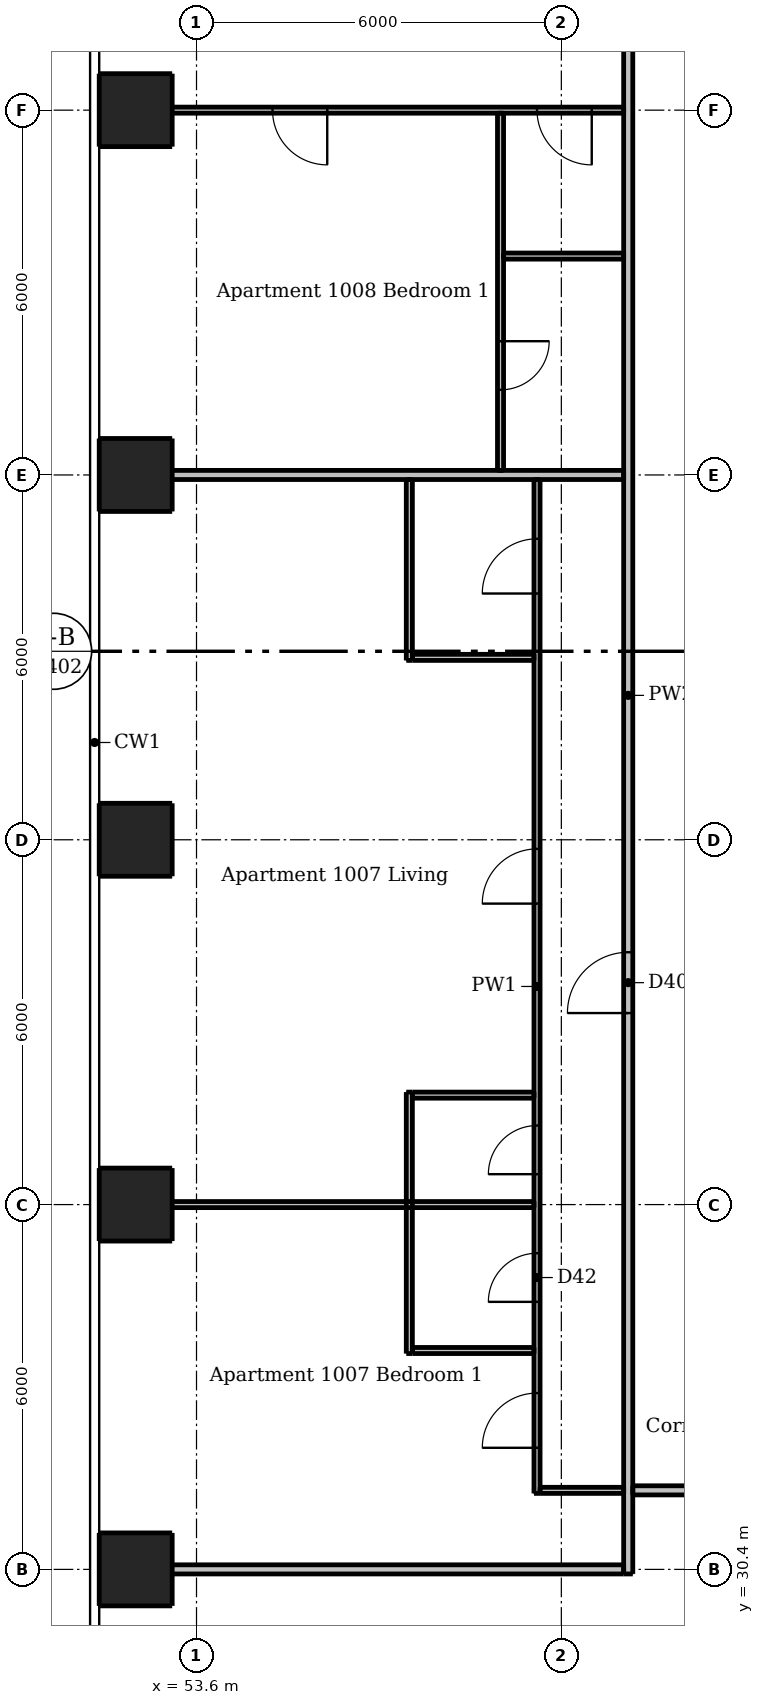
"""IFC4 building model, lengths in metres.
Left out: names, types, materials, properties, quantities, classifications, styles, units other than length and angle.
Written with IfcOpenShell. Run it as: python <this file> out.ifc"""

import sys

from ifc_helpers import new_model, si_unit, direction, frame, frame_2d, origin, origin_2d, place, context, subcontext, project, spatial, rectangle, extrude, element, fill, save


model = new_model("IFC4")
c1 = context("Model", 3, precision=1e-05, world=origin(), true_north=direction((0.0, 1.0)))
c2 = subcontext(c1, "Body", "Model", "MODEL_VIEW")
j1 = project(units=[si_unit("LENGTHUNIT", "METRE"), si_unit("PLANEANGLEUNIT", "RADIAN")], contexts=[c1])
p1 = place(None, origin())
s1 = spatial("IfcSite", under=j1, at=p1, CompositionType="ELEMENT")
p2 = place(p1, origin())
s2 = spatial("IfcBuilding", under=s1, at=p2, CompositionType="ELEMENT")
p3 = place(p2, frame((0.0, 0.0, 40.0)))
s3 = spatial("IfcBuildingStorey", under=s2, at=p3, CompositionType="ELEMENT", Elevation=40.0)
for number, where, z_axis, x_axis in (
    (1, (52.6, 30.4, 0.0), (0.0, 0.0, 1.0), (1.0, 0.0, 0.0)),
    (2, (52.6, 36.4, 0.0), (0.0, 0.0, 1.0), (1.0, 0.0, 0.0)),
    (3, (52.6, 42.4, 0.0), (0.0, 0.0, 1.0), (1.0, 0.0, 0.0)),
    (4, (52.6, 48.4, 0.0), (0.0, 0.0, 1.0), (1.0, 0.0, 0.0)),
    (5, (52.6, 54.4, 0.0), (0.0, 0.0, 1.0), (1.0, 0.0, 0.0)),
):
    element("IfcColumn", number, at=place(p3, frame(where, z_axis=z_axis, x_axis=x_axis)), inside=s3, PredefinedType="COLUMN", context=c2, shape_type="SweptSolid", body=[
        extrude(rectangle(XDim=1.2, YDim=1.2, at=origin_2d()), origin(), (0.0, 0.0, 1.0), 3.05),
    ])
p4 = place(p3, frame((57.1, 33.95, 0.0), z_axis=(0.0, 0.0, 1.0), x_axis=(0.0, 1.0, 0.0)))
e6 = element("IfcWall", 6, at=p4, inside=s3, PredefinedType="PARTITIONING", context=c2, shape_type="SweptSolid", body=[
    extrude(rectangle(XDim=4.3, YDim=0.1, at=frame_2d((2.15, 0.0))), origin(), (0.0, 0.0, 1.0), 3.05),
])
p5 = place(p3, frame((57.1, 45.35, 0.0), z_axis=(0.0, 0.0, 1.0), x_axis=(0.0, 1.0, 0.0)))
e7 = element("IfcWall", 7, at=p5, inside=s3, PredefinedType="PARTITIONING", context=c2, shape_type="SweptSolid", body=[
    extrude(rectangle(XDim=2.975, YDim=0.1, at=frame_2d((1.487, 0.0))), origin(), (0.0, 0.0, 1.0), 3.05),
])
p6 = place(p3, frame((58.6, 54.35, 0.0), z_axis=(0.0, 0.0, 1.0), x_axis=(0.0, -1.0, 0.0)))
e8 = element("IfcWall", 8, at=p6, inside=s3, PredefinedType="PARTITIONING", context=c2, shape_type="SweptSolid", body=[
    extrude(rectangle(XDim=5.875, YDim=0.1, at=frame_2d((2.938, 0.0))), origin(), (0.0, 0.0, 1.0), 3.05),
])
p7 = place(p6, frame((3.75, 0.0, 0.0)))
e9 = element("IfcOpeningElement", 9, at=p7, cuts=e8, PredefinedType="OPENING", context=c2, shape_type="SweptSolid", body=[
    extrude(rectangle(XDim=0.8, YDim=2.1, at=frame_2d((0.4, 1.05))), frame((0.0, 0.06, 0.0), z_axis=(0.0, -1.0, 0.0), x_axis=(1.0, 0.0, 0.0)), (0.0, 0.0, 1.0), 0.12),
])
p8 = place(p3, frame((59.2, 31.65, 0.0), z_axis=(0.0, 0.0, 1.0), x_axis=(0.0, 1.0, 0.0)))
e10 = element("IfcWall", 10, at=p8, inside=s3, PredefinedType="PARTITIONING", context=c2, shape_type="SweptSolid", body=[
    extrude(rectangle(XDim=16.675, YDim=0.1, at=frame_2d((8.337, 0.0))), origin(), (0.0, 0.0, 1.0), 3.05),
])
p9 = place(p8, frame((9.7, 0.0, 0.0)))
e11 = element("IfcOpeningElement", 11, at=p9, cuts=e10, PredefinedType="OPENING", context=c2, shape_type="SweptSolid", body=[
    extrude(rectangle(XDim=0.9, YDim=2.1, at=frame_2d((0.45, 1.05))), frame((0.0, 0.06, 0.0), z_axis=(0.0, -1.0, 0.0), x_axis=(1.0, 0.0, 0.0)), (0.0, 0.0, 1.0), 0.12),
])
p10 = place(p8, frame((14.8, 0.0, 0.0)))
e12 = element("IfcOpeningElement", 12, at=p10, cuts=e10, PredefinedType="OPENING", context=c2, shape_type="SweptSolid", body=[
    extrude(rectangle(XDim=0.9, YDim=2.1, at=frame_2d((0.45, 1.05))), frame((0.0, 0.06, 0.0), z_axis=(0.0, -1.0, 0.0), x_axis=(1.0, 0.0, 0.0)), (0.0, 0.0, 1.0), 0.12),
])
p11 = place(p8, frame((5.25, 0.0, 0.0)))
e13 = element("IfcOpeningElement", 13, at=p11, cuts=e10, PredefinedType="OPENING", context=c2, shape_type="SweptSolid", body=[
    extrude(rectangle(XDim=0.8, YDim=2.1, at=frame_2d((0.4, 1.05))), frame((0.0, 0.06, 0.0), z_axis=(0.0, -1.0, 0.0), x_axis=(1.0, 0.0, 0.0)), (0.0, 0.0, 1.0), 0.12),
])
p12 = place(p8, frame((0.75, 0.0, 0.0)))
e14 = element("IfcOpeningElement", 14, at=p12, cuts=e10, PredefinedType="OPENING", context=c2, shape_type="SweptSolid", body=[
    extrude(rectangle(XDim=0.9, YDim=2.1, at=frame_2d((0.45, 1.05))), frame((0.0, 0.06, 0.0), z_axis=(0.0, -1.0, 0.0), x_axis=(1.0, 0.0, 0.0)), (0.0, 0.0, 1.0), 0.12),
])
p13 = place(p8, frame((3.15, 0.0, 0.0)))
e15 = element("IfcOpeningElement", 15, at=p13, cuts=e10, PredefinedType="OPENING", context=c2, shape_type="SweptSolid", body=[
    extrude(rectangle(XDim=0.8, YDim=2.1, at=frame_2d((0.4, 1.05))), frame((0.0, 0.06, 0.0), z_axis=(0.0, -1.0, 0.0), x_axis=(1.0, 0.0, 0.0)), (0.0, 0.0, 1.0), 0.12),
])
p14 = place(p3, frame((60.625, 54.4, 0.0), z_axis=(0.0, 0.0, 1.0), x_axis=(-1.0, 0.0, 0.0)))
e16 = element("IfcWall", 16, at=p14, inside=s3, PredefinedType="PARTITIONING", context=c2, shape_type="SweptSolid", body=[
    extrude(rectangle(XDim=8.625, YDim=0.1, at=frame_2d((4.312, 0.0))), origin(), (0.0, 0.0, 1.0), 2.516),
])
p15 = place(p14, frame((0.525, 0.0, 0.0)))
e17 = element("IfcOpeningElement", 17, at=p15, cuts=e16, PredefinedType="OPENING", context=c2, shape_type="SweptSolid", body=[
    extrude(rectangle(XDim=0.9, YDim=2.1, at=frame_2d((0.45, 1.05))), frame((0.0, 0.06, 0.0), z_axis=(0.0, -1.0, 0.0), x_axis=(1.0, 0.0, 0.0)), (0.0, 0.0, 1.0), 0.12),
])
p16 = place(p14, frame((4.875, 0.0, 0.0)))
e18 = element("IfcOpeningElement", 18, at=p16, cuts=e16, PredefinedType="OPENING", context=c2, shape_type="SweptSolid", body=[
    extrude(rectangle(XDim=0.9, YDim=2.1, at=frame_2d((0.45, 1.05))), frame((0.0, 0.06, 0.0), z_axis=(0.0, -1.0, 0.0), x_axis=(1.0, 0.0, 0.0)), (0.0, 0.0, 1.0), 0.12),
])
p17 = place(p3, frame((58.65, 52.0, 0.0), z_axis=(0.0, 0.0, 1.0), x_axis=(1.0, 0.0, 0.0)))
e19 = element("IfcWall", 19, at=p17, inside=s3, PredefinedType="PARTITIONING", context=c2, shape_type="SweptSolid", body=[
    extrude(rectangle(XDim=1.975, YDim=0.1, at=frame_2d((0.988, 0.0))), origin(), (0.0, 0.0, 1.0), 3.05),
])
for number, where, z_axis, x_axis in (
    (20, (57.15, 45.4, 0.0), (0.0, 0.0, 1.0), (1.0, 0.0, 0.0)),
    (21, (57.15, 38.2, 0.0), (0.0, 0.0, 1.0), (1.0, 0.0, 0.0)),
):
    element("IfcWall", number, at=place(p3, frame(where, z_axis=z_axis, x_axis=x_axis)), inside=s3, PredefinedType="PARTITIONING", context=c2, shape_type="SweptSolid", body=[
        extrude(rectangle(XDim=2.0, YDim=0.1, at=frame_2d((1.0, 0.0))), origin(), (0.0, 0.0, 1.0), 3.05),
    ])
p18 = place(p3, frame((52.0, 36.4, 0.0), z_axis=(0.0, 0.0, 1.0), x_axis=(1.0, 0.0, 0.0)))
e22 = element("IfcWall", 22, at=p18, inside=s3, PredefinedType="PARTITIONING", context=c2, shape_type="SweptSolid", body=[
    extrude(rectangle(XDim=7.15, YDim=0.1, at=frame_2d((3.575, 0.0))), origin(), (0.0, 0.0, 1.0), 2.516),
])
p19 = place(p3, frame((57.15, 34.0, 0.0), z_axis=(0.0, 0.0, 1.0), x_axis=(1.0, 0.0, 0.0)))
e23 = element("IfcWall", 23, at=p19, inside=s3, PredefinedType="PARTITIONING", context=c2, shape_type="SweptSolid", body=[
    extrude(rectangle(XDim=2.0, YDim=0.1, at=frame_2d((1.0, 0.0))), origin(), (0.0, 0.0, 1.0), 3.05),
])
p20 = place(p3, frame((59.25, 31.7, 0.0), z_axis=(0.0, 0.0, 1.0), x_axis=(1.0, 0.0, 0.0)))
e24 = element("IfcWall", 24, at=p20, inside=s3, PredefinedType="PARTITIONING", context=c2, shape_type="SweptSolid", body=[
    extrude(rectangle(XDim=1.375, YDim=0.1, at=frame_2d((0.688, 0.0))), origin(), (0.0, 0.0, 1.0), 3.05),
])
p21 = place(p3, frame((60.7, 30.325, 0.0), z_axis=(0.0, 0.0, 1.0), x_axis=(0.0, 1.0, 0.0)))
e25 = element("IfcWall", 25, at=p21, inside=s3, PredefinedType="PARTITIONING", context=c2, shape_type="SweptSolid", body=[
    extrude(rectangle(XDim=28.9, YDim=0.15, at=frame_2d((14.45, 0.0))), origin(), (0.0, 0.0, 1.0), 3.05),
])
p22 = place(p21, frame((9.225, 0.0, 0.0)))
e26 = element("IfcOpeningElement", 26, at=p22, cuts=e25, PredefinedType="OPENING", context=c2, shape_type="SweptSolid", body=[
    extrude(rectangle(XDim=1.0, YDim=2.1, at=frame_2d((0.5, 1.05))), frame((0.0, 0.085, 0.0), z_axis=(0.0, -1.0, 0.0), x_axis=(1.0, 0.0, 0.0)), (0.0, 0.0, 1.0), 0.17),
])
p23 = place(p21, frame((26.025, 0.0, 0.0)))
e27 = element("IfcOpeningElement", 27, at=p23, cuts=e25, PredefinedType="OPENING", context=c2, shape_type="SweptSolid", body=[
    extrude(rectangle(XDim=1.0, YDim=2.1, at=frame_2d((0.5, 1.05))), frame((0.0, 0.085, 0.0), z_axis=(0.0, -1.0, 0.0), x_axis=(1.0, 0.0, 0.0)), (0.0, 0.0, 1.0), 0.17),
])
p24 = place(p3, frame((52.0, 48.4, 0.0), z_axis=(0.0, 0.0, 1.0), x_axis=(1.0, 0.0, 0.0)))
e28 = element("IfcWall", 28, at=p24, inside=s3, PredefinedType="PARTITIONING", context=c2, shape_type="SweptSolid", body=[
    extrude(rectangle(XDim=8.625, YDim=0.15, at=frame_2d((4.312, 0.0))), origin(), (0.0, 0.0, 1.0), 2.516),
])
p25 = place(p3, frame((89.525, 31.7, 0.0), z_axis=(0.0, 0.0, 1.0), x_axis=(-1.0, 0.0, 0.0)))
e29 = element("IfcWall", 29, at=p25, inside=s3, PredefinedType="PARTITIONING", context=c2, shape_type="SweptSolid", body=[
    extrude(rectangle(XDim=28.75, YDim=0.15, at=frame_2d((14.375, 0.0))), origin(), (0.0, 0.0, 1.0), 3.05),
])
p26 = place(p25, frame((24.475, 0.0, 0.0)))
e30 = element("IfcOpeningElement", 30, at=p26, cuts=e29, PredefinedType="OPENING", context=c2, shape_type="SweptSolid", body=[
    extrude(rectangle(XDim=1.0, YDim=2.1, at=frame_2d((0.5, 1.05))), frame((0.0, 0.085, 0.0), z_axis=(0.0, -1.0, 0.0), x_axis=(1.0, 0.0, 0.0)), (0.0, 0.0, 1.0), 0.17),
])
p27 = place(p25, frame((7.575, 0.0, 0.0)))
e31 = element("IfcOpeningElement", 31, at=p27, cuts=e29, PredefinedType="OPENING", context=c2, shape_type="SweptSolid", body=[
    extrude(rectangle(XDim=1.0, YDim=2.1, at=frame_2d((0.5, 1.05))), frame((0.0, 0.085, 0.0), z_axis=(0.0, -1.0, 0.0), x_axis=(1.0, 0.0, 0.0)), (0.0, 0.0, 1.0), 0.17),
])
p28 = place(p3, frame((52.0, 30.4, 0.0), z_axis=(0.0, 0.0, 1.0), x_axis=(1.0, 0.0, 0.0)))
e32 = element("IfcWall", 32, at=p28, inside=s3, PredefinedType="PARTITIONING", context=c2, shape_type="SweptSolid", body=[
    extrude(rectangle(XDim=8.625, YDim=0.15, at=frame_2d((4.312, 0.0))), origin(), (0.0, 0.0, 1.0), 2.647),
])
p29 = place(p22, origin())
e33 = element("IfcDoor", 33, at=p29, inside=s3, OperationType="SINGLE_SWING_LEFT", PredefinedType="DOOR", context=c2, shape_type="SweptSolid", body=[
    extrude(rectangle(XDim=1.0, YDim=2.1, at=frame_2d((0.5, 1.05))), frame((0.0, 0.025, 0.0), z_axis=(0.0, -1.0, 0.0), x_axis=(1.0, 0.0, 0.0)), (0.0, 0.0, 1.0), 0.05),
])
fill(e26, e33)
p30 = place(p9, origin())
e34 = element("IfcDoor", 34, at=p30, inside=s3, OperationType="SINGLE_SWING_LEFT", PredefinedType="DOOR", context=c2, shape_type="SweptSolid", body=[
    extrude(rectangle(XDim=0.9, YDim=2.1, at=frame_2d((0.45, 1.05))), frame((0.0, 0.025, 0.0), z_axis=(0.0, -1.0, 0.0), x_axis=(1.0, 0.0, 0.0)), (0.0, 0.0, 1.0), 0.05),
])
fill(e11, e34)
p31 = place(p10, origin())
e35 = element("IfcDoor", 35, at=p31, inside=s3, OperationType="SINGLE_SWING_LEFT", PredefinedType="DOOR", context=c2, shape_type="SweptSolid", body=[
    extrude(rectangle(XDim=0.9, YDim=2.1, at=frame_2d((0.45, 1.05))), frame((0.0, 0.025, 0.0), z_axis=(0.0, -1.0, 0.0), x_axis=(1.0, 0.0, 0.0)), (0.0, 0.0, 1.0), 0.05),
])
fill(e12, e35)
p32 = place(p11, origin())
e36 = element("IfcDoor", 36, at=p32, inside=s3, OperationType="SINGLE_SWING_LEFT", PredefinedType="DOOR", context=c2, shape_type="SweptSolid", body=[
    extrude(rectangle(XDim=0.8, YDim=2.1, at=frame_2d((0.4, 1.05))), frame((0.0, 0.025, 0.0), z_axis=(0.0, -1.0, 0.0), x_axis=(1.0, 0.0, 0.0)), (0.0, 0.0, 1.0), 0.05),
])
fill(e13, e36)
p33 = place(p12, origin())
e37 = element("IfcDoor", 37, at=p33, inside=s3, OperationType="SINGLE_SWING_LEFT", PredefinedType="DOOR", context=c2, shape_type="SweptSolid", body=[
    extrude(rectangle(XDim=0.9, YDim=2.1, at=frame_2d((0.45, 1.05))), frame((0.0, 0.025, 0.0), z_axis=(0.0, -1.0, 0.0), x_axis=(1.0, 0.0, 0.0)), (0.0, 0.0, 1.0), 0.05),
])
fill(e14, e37)
p34 = place(p13, origin())
e38 = element("IfcDoor", 38, at=p34, inside=s3, OperationType="SINGLE_SWING_LEFT", PredefinedType="DOOR", context=c2, shape_type="SweptSolid", body=[
    extrude(rectangle(XDim=0.8, YDim=2.1, at=frame_2d((0.4, 1.05))), frame((0.0, 0.025, 0.0), z_axis=(0.0, -1.0, 0.0), x_axis=(1.0, 0.0, 0.0)), (0.0, 0.0, 1.0), 0.05),
])
fill(e15, e38)
p35 = place(p15, origin())
e39 = element("IfcDoor", 39, at=p35, inside=s3, OperationType="SINGLE_SWING_LEFT", PredefinedType="DOOR", context=c2, shape_type="SweptSolid", body=[
    extrude(rectangle(XDim=0.9, YDim=2.1, at=frame_2d((0.45, 1.05))), frame((0.0, 0.025, 0.0), z_axis=(0.0, -1.0, 0.0), x_axis=(1.0, 0.0, 0.0)), (0.0, 0.0, 1.0), 0.05),
])
fill(e17, e39)
p36 = place(p16, origin())
e40 = element("IfcDoor", 40, at=p36, inside=s3, OperationType="SINGLE_SWING_LEFT", PredefinedType="DOOR", context=c2, shape_type="SweptSolid", body=[
    extrude(rectangle(XDim=0.9, YDim=2.1, at=frame_2d((0.45, 1.05))), frame((0.0, 0.025, 0.0), z_axis=(0.0, -1.0, 0.0), x_axis=(1.0, 0.0, 0.0)), (0.0, 0.0, 1.0), 0.05),
])
fill(e18, e40)
p37 = place(p7, origin())
e41 = element("IfcDoor", 41, at=p37, inside=s3, OperationType="SINGLE_SWING_LEFT", PredefinedType="DOOR", context=c2, shape_type="SweptSolid", body=[
    extrude(rectangle(XDim=0.8, YDim=2.1, at=frame_2d((0.4, 1.05))), frame((0.0, 0.025, 0.0), z_axis=(0.0, -1.0, 0.0), x_axis=(1.0, 0.0, 0.0)), (0.0, 0.0, 1.0), 0.05),
])
fill(e9, e41)
save(model, sys.argv[1])
